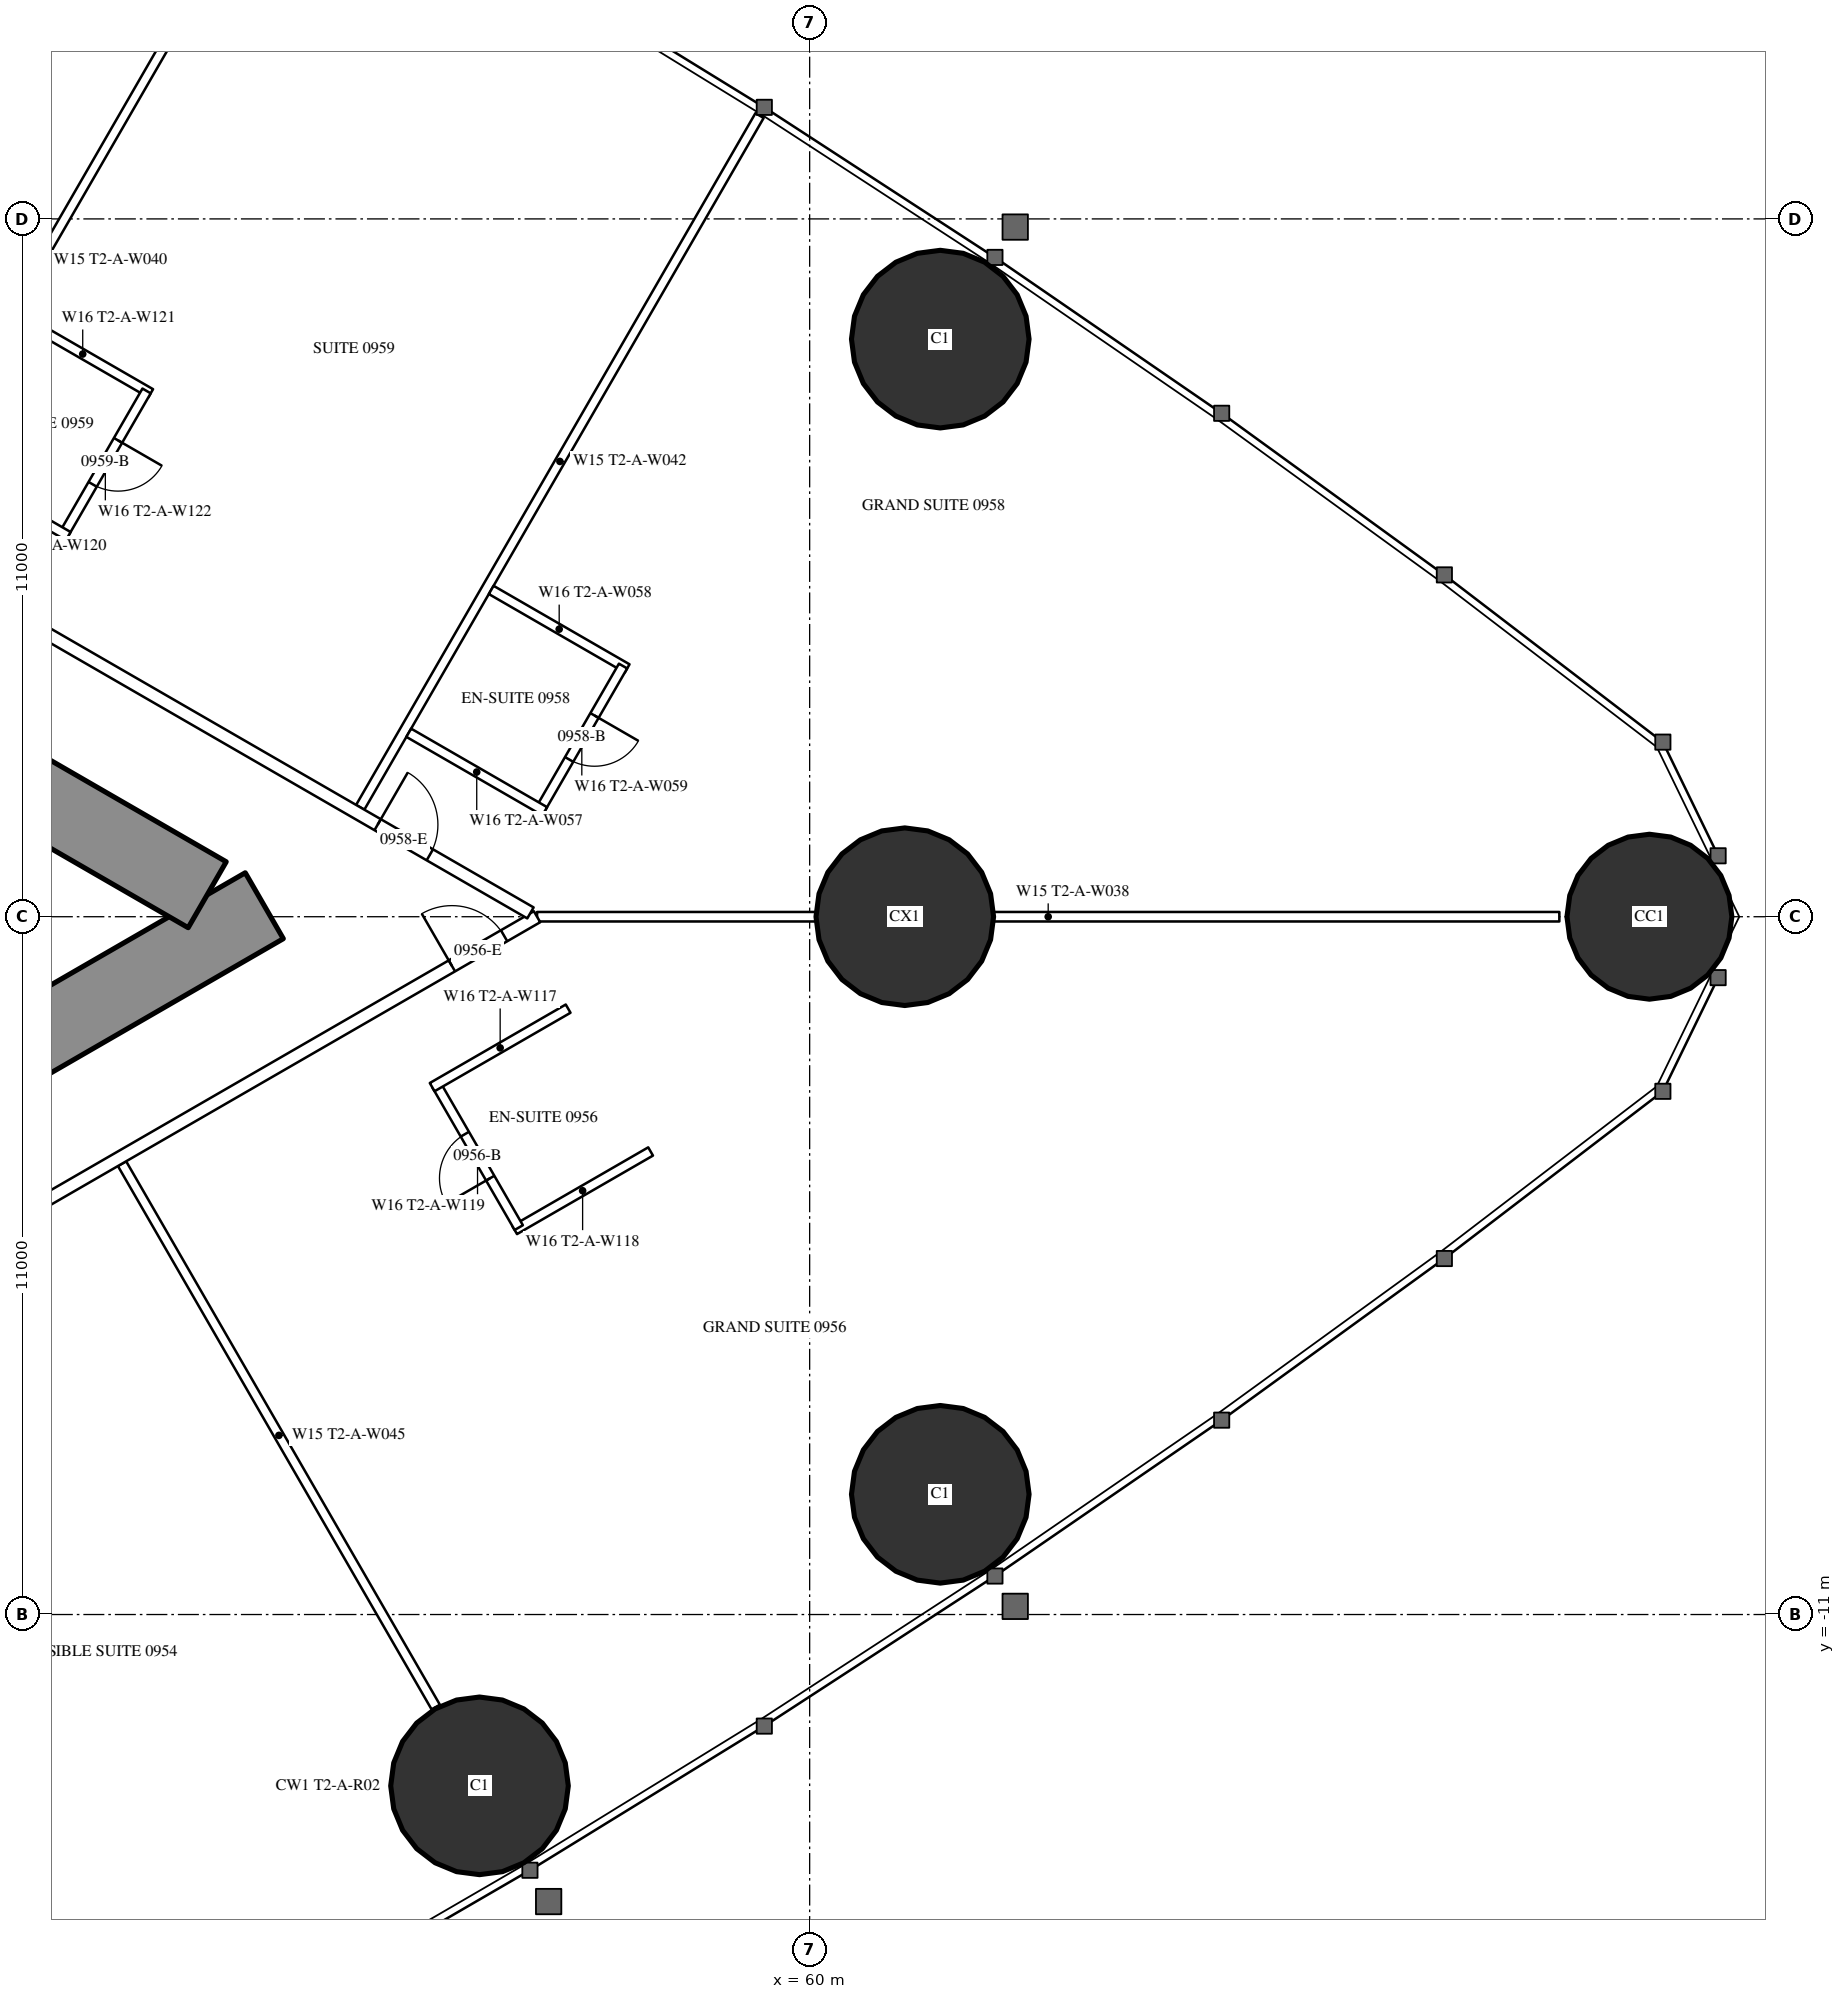
"""IFC4 building model, lengths in metres.
Left out: names, types, materials, properties, quantities, classifications, styles, units other than length and angle.
Written with IfcOpenShell. Run it as: python <this file> out.ifc"""

import sys

from ifc_helpers import new_model, si_unit, direction, frame, frame_2d, origin, origin_2d, place, context, subcontext, project, spatial, rectangle, hollow_circle, extrude, element, fill, save


model = new_model("IFC4")
c1 = context("Model", 3, precision=1e-05, world=origin(), true_north=direction((0.0, 1.0)))
c2 = subcontext(c1, "Body", "Model", "MODEL_VIEW")
j1 = project(units=[si_unit("LENGTHUNIT", "METRE"), si_unit("PLANEANGLEUNIT", "RADIAN")], contexts=[c1])
p1 = place(None, origin())
s1 = spatial("IfcSite", under=j1, at=p1, CompositionType="ELEMENT")
p2 = place(p1, origin())
s2 = spatial("IfcBuilding", under=s1, at=p2, CompositionType="ELEMENT")
p3 = place(p2, frame((0.0, 0.0, 39.0)))
s3 = spatial("IfcBuildingStorey", under=s2, at=p3, CompositionType="ELEMENT", Elevation=39.0)
p4 = place(p3, frame((73.239, 0.0, 0.0), z_axis=(0.0, 0.0, 1.0), x_axis=(1.0, 0.0, 0.0)))
e1 = element("IfcColumn", 1, at=p4, inside=s3, PredefinedType="COLUMN", context=c2, shape_type="SweptSolid", body=[
    extrude(hollow_circle(Radius=1.3, WallThickness=0.1, at=origin_2d()), origin(), (0.0, 0.0, 1.0), 3.5),
])
for number, where, z_axis, x_axis in (
    (2, (62.059, 9.105, 0.0), (0.0, 0.0, 1.0), (1.0, 0.0, 0.0)),
    (3, (54.795, -13.701, 0.0), (0.0, 0.0, 1.0), (1.0, 0.0, 0.0)),
    (4, (62.059, -9.105, 0.0), (0.0, 0.0, 1.0), (1.0, 0.0, 0.0)),
):
    element("IfcColumn", number, at=place(p3, frame(where, z_axis=z_axis, x_axis=x_axis)), inside=s3, PredefinedType="COLUMN", context=c2, shape_type="SweptSolid", body=[
        extrude(hollow_circle(Radius=1.4, WallThickness=0.12, at=origin_2d()), origin(), (0.0, 0.0, 1.0), 3.5),
    ])
p5 = place(p3, frame((61.5, 0.0, 0.0), z_axis=(0.0, 0.0, 1.0), x_axis=(1.0, 0.0, 0.0)))
e5 = element("IfcColumn", 5, at=p5, inside=s3, PredefinedType="COLUMN", context=c2, shape_type="SweptSolid", body=[
    extrude(hollow_circle(Radius=1.4, WallThickness=0.1, at=origin_2d()), origin(), (0.0, 0.0, 1.0), 3.5),
])
p6 = place(p3, frame((27.2, -13.8, 0.0), z_axis=(0.0, 0.0, 1.0), x_axis=(0.866027159892, 0.499996958321, 0.0)))
e6 = element("IfcWall", 6, at=p6, inside=s3, PredefinedType="SHEAR", context=c2, shape_type="SweptSolid", body=[
    extrude(rectangle(XDim=27.947, YDim=1.2, at=frame_2d((13.973, 0.0))), origin(), (0.0, 0.0, 1.0), 3.5),
])
p7 = place(p6, frame((4.6, 0.0, 0.0)))
e7 = element("IfcOpeningElement", 7, at=p7, cuts=e6, PredefinedType="OPENING", context=c2, shape_type="SweptSolid", body=[
    extrude(rectangle(XDim=1.0, YDim=2.2, at=frame_2d((0.5, 1.1))), frame((0.0, 0.61, 0.0), z_axis=(0.0, -1.0, 0.0), x_axis=(1.0, 0.0, 0.0)), (0.0, 0.0, 1.0), 1.22),
])
p8 = place(p6, frame((13.395, 0.0, 0.0)))
e8 = element("IfcOpeningElement", 8, at=p8, cuts=e6, PredefinedType="OPENING", context=c2, shape_type="SweptSolid", body=[
    extrude(rectangle(XDim=1.8, YDim=2.2, at=frame_2d((0.9, 1.1))), frame((0.0, 0.61, 0.0), z_axis=(0.0, -1.0, 0.0), x_axis=(1.0, 0.0, 0.0)), (0.0, 0.0, 1.0), 1.22),
])
p9 = place(p3, frame((27.2, 13.8, 0.0), z_axis=(0.0, 0.0, 1.0), x_axis=(0.866024515034, -0.500001539357, 0.0)))
e9 = element("IfcWall", 9, at=p9, inside=s3, PredefinedType="SHEAR", context=c2, shape_type="SweptSolid", body=[
    extrude(rectangle(XDim=26.907, YDim=1.2, at=frame_2d((13.454, 0.0))), origin(), (0.0, 0.0, 1.0), 3.5),
])
p10 = place(p9, frame((4.6, 0.0, 0.0)))
e10 = element("IfcOpeningElement", 10, at=p10, cuts=e9, PredefinedType="OPENING", context=c2, shape_type="SweptSolid", body=[
    extrude(rectangle(XDim=1.0, YDim=2.2, at=frame_2d((0.5, 1.1))), frame((0.0, 0.61, 0.0), z_axis=(0.0, -1.0, 0.0), x_axis=(1.0, 0.0, 0.0)), (0.0, 0.0, 1.0), 1.22),
])
p11 = place(p9, frame((13.395, 0.0, 0.0)))
e11 = element("IfcOpeningElement", 11, at=p11, cuts=e9, PredefinedType="OPENING", context=c2, shape_type="SweptSolid", body=[
    extrude(rectangle(XDim=1.8, YDim=2.2, at=frame_2d((0.9, 1.1))), frame((0.0, 0.61, 0.0), z_axis=(0.0, -1.0, 0.0), x_axis=(1.0, 0.0, 0.0)), (0.0, 0.0, 1.0), 1.22),
])
p12 = place(p3, frame((49.159, -3.893, 0.0), z_axis=(0.0, 0.0, 1.0), x_axis=(0.499998773722, -0.866026111775, 0.0)))
e12 = element("IfcWall", 12, at=p12, inside=s3, PredefinedType="PARTITIONING", context=c2, shape_type="SweptSolid", body=[
    extrude(rectangle(XDim=9.892, YDim=0.15, at=frame_2d((4.946, 0.0))), origin(), (0.0, 0.0, 1.0), 2.25),
])
p13 = place(p3, frame((45.403, 6.062, 0.0), z_axis=(0.0, 0.0, 1.0), x_axis=(0.500013434677, 0.866017647131, 0.0)))
e13 = element("IfcWall", 13, at=p13, inside=s3, PredefinedType="PARTITIONING", context=c2, shape_type="SweptSolid", body=[
    extrude(rectangle(XDim=9.902, YDim=0.15, at=frame_2d((4.951, 0.0))), origin(), (0.0, 0.0, 1.0), 2.25),
])
p14 = place(p3, frame((52.915, 1.725, 0.0), z_axis=(0.0, 0.0, 1.0), x_axis=(0.499997163113, 0.866027041656, 0.0)))
e14 = element("IfcWall", 14, at=p14, inside=s3, PredefinedType="PARTITIONING", context=c2, shape_type="SweptSolid", body=[
    extrude(rectangle(XDim=12.591, YDim=0.15, at=frame_2d((6.295, 0.0))), origin(), (0.0, 0.0, 1.0), 3.25),
])
p15 = place(p3, frame((55.702, 0.0, 0.0), z_axis=(0.0, 0.0, 1.0), x_axis=(1.0, 0.0, 0.0)))
e15 = element("IfcWall", 15, at=p15, inside=s3, PredefinedType="PARTITIONING", context=c2, shape_type="SweptSolid", body=[
    extrude(rectangle(XDim=16.117, YDim=0.15, at=frame_2d((8.059, 0.0))), origin(), (0.0, 0.0, 1.0), 2.25),
])
p16 = place(p3, frame((37.96, -10.243, 0.0), z_axis=(0.0, 0.0, 1.0), x_axis=(0.866026429433, 0.499998223521, 0.0)))
e16 = element("IfcWall", 16, at=p16, inside=s3, PredefinedType="PARTITIONING", context=c2, shape_type="SweptSolid", body=[
    extrude(rectangle(XDim=20.487, YDim=0.2, at=frame_2d((10.243, 0.0))), origin(), (0.0, 0.0, 1.0), 3.25),
])
p17 = place(p16, frame((7.325, 0.0, 0.0)))
e17 = element("IfcOpeningElement", 17, at=p17, cuts=e16, PredefinedType="OPENING", context=c2, shape_type="SweptSolid", body=[
    extrude(rectangle(XDim=1.0, YDim=2.2, at=frame_2d((0.5, 1.1))), frame((0.0, 0.11, 0.0), z_axis=(0.0, -1.0, 0.0), x_axis=(1.0, 0.0, 0.0)), (0.0, 0.0, 1.0), 0.22),
])
p18 = place(p16, frame((18.937, 0.0, 0.0)))
e18 = element("IfcOpeningElement", 18, at=p18, cuts=e16, PredefinedType="OPENING", context=c2, shape_type="SweptSolid", body=[
    extrude(rectangle(XDim=0.95, YDim=2.2, at=frame_2d((0.475, 1.1))), frame((0.0, 0.11, 0.0), z_axis=(0.0, -1.0, 0.0), x_axis=(1.0, 0.0, 0.0)), (0.0, 0.0, 1.0), 0.22),
])
p19 = place(p16, frame((0.6, 0.0, 0.0)))
e19 = element("IfcOpeningElement", 19, at=p19, cuts=e16, PredefinedType="OPENING", context=c2, shape_type="SweptSolid", body=[
    extrude(rectangle(XDim=0.95, YDim=2.2, at=frame_2d((0.475, 1.1))), frame((0.0, 0.11, 0.0), z_axis=(0.0, -1.0, 0.0), x_axis=(1.0, 0.0, 0.0)), (0.0, 0.0, 1.0), 0.22),
])
p20 = place(p3, frame((36.834, 10.894, 0.0), z_axis=(0.0, 0.0, 1.0), x_axis=(0.866028157229, -0.499995230863, 0.0)))
e20 = element("IfcWall", 20, at=p20, inside=s3, PredefinedType="PARTITIONING", context=c2, shape_type="SweptSolid", body=[
    extrude(rectangle(XDim=21.667, YDim=0.2, at=frame_2d((10.833, 0.0))), origin(), (0.0, 0.0, 1.0), 3.25),
])
p21 = place(p20, frame((18.885, 0.0, 0.0)))
e21 = element("IfcOpeningElement", 21, at=p21, cuts=e20, PredefinedType="OPENING", context=c2, shape_type="SweptSolid", body=[
    extrude(rectangle(XDim=0.95, YDim=2.2, at=frame_2d((0.475, 1.1))), frame((0.0, 0.11, 0.0), z_axis=(0.0, -1.0, 0.0), x_axis=(1.0, 0.0, 0.0)), (0.0, 0.0, 1.0), 0.22),
])
p22 = place(p20, frame((10.212, 0.0, 0.0)))
e22 = element("IfcOpeningElement", 22, at=p22, cuts=e20, PredefinedType="OPENING", context=c2, shape_type="SweptSolid", body=[
    extrude(rectangle(XDim=0.95, YDim=2.2, at=frame_2d((0.475, 1.1))), frame((0.0, 0.11, 0.0), z_axis=(0.0, -1.0, 0.0), x_axis=(1.0, 0.0, 0.0)), (0.0, 0.0, 1.0), 0.22),
])
p23 = place(p20, frame((8.225, 0.0, 0.0)))
e23 = element("IfcOpeningElement", 23, at=p23, cuts=e20, PredefinedType="OPENING", context=c2, shape_type="SweptSolid", body=[
    extrude(rectangle(XDim=0.95, YDim=2.2, at=frame_2d((0.475, 1.1))), frame((0.0, 0.11, 0.0), z_axis=(0.0, -1.0, 0.0), x_axis=(1.0, 0.0, 0.0)), (0.0, 0.0, 1.0), 0.22),
])
p24 = place(p20, frame((1.825, 0.0, 0.0)))
e24 = element("IfcOpeningElement", 24, at=p24, cuts=e20, PredefinedType="OPENING", context=c2, shape_type="SweptSolid", body=[
    extrude(rectangle(XDim=0.95, YDim=2.2, at=frame_2d((0.475, 1.1))), frame((0.0, 0.11, 0.0), z_axis=(0.0, -1.0, 0.0), x_axis=(1.0, 0.0, 0.0)), (0.0, 0.0, 1.0), 0.22),
])
p25 = place(p20, frame((0.246, 0.0, 0.0)))
e25 = element("IfcOpeningElement", 25, at=p25, cuts=e20, PredefinedType="OPENING", context=c2, shape_type="SweptSolid", body=[
    extrude(rectangle(XDim=0.9, YDim=2.2, at=frame_2d((0.45, 1.1))), frame((0.0, 0.11, 0.0), z_axis=(0.0, -1.0, 0.0), x_axis=(1.0, 0.0, 0.0)), (0.0, 0.0, 1.0), 0.22),
])
p26 = place(p3, frame((55.349, -4.938, 0.0), z_axis=(0.0, 0.0, 1.0), x_axis=(0.866006523861, 0.500032699561, 0.0)))
e26 = element("IfcWall", 26, at=p26, inside=s3, PredefinedType="PARTITIONING", context=c2, shape_type="SweptSolid", body=[
    extrude(rectangle(XDim=2.475, YDim=0.15, at=frame_2d((1.237, 0.0))), origin(), (0.0, 0.0, 1.0), 3.25),
])
p27 = place(p3, frame((54.114, -2.649, 0.0), z_axis=(0.0, 0.0, 1.0), x_axis=(0.500006934395, -0.866021400173, 0.0)))
e27 = element("IfcWall", 27, at=p27, inside=s3, PredefinedType="PARTITIONING", context=c2, shape_type="SweptSolid", body=[
    extrude(rectangle(XDim=2.6, YDim=0.15, at=frame_2d((1.3, 0.0))), origin(), (0.0, 0.0, 1.0), 3.25),
])
p28 = place(p27, frame((0.9, 0.0, 0.0)))
e28 = element("IfcOpeningElement", 28, at=p28, cuts=e27, PredefinedType="OPENING", context=c2, shape_type="SweptSolid", body=[
    extrude(rectangle(XDim=0.8, YDim=2.2, at=frame_2d((0.4, 1.1))), frame((0.0, 0.085, 0.0), z_axis=(0.0, -1.0, 0.0), x_axis=(1.0, 0.0, 0.0)), (0.0, 0.0, 1.0), 0.17),
])
for number, where, z_axis, x_axis in (
    (29, (54.049, -2.687, 0.0), (0.0, 0.0, 1.0), (0.866, 0.5, 0.0)),
    (30, (54.98, 5.151, 0.0), (0.0, 0.0, 1.0), (0.866, -0.5, 0.0)),
):
    element("IfcWall", number, at=place(p3, frame(where, z_axis=z_axis, x_axis=x_axis)), inside=s3, PredefinedType="PARTITIONING", context=c2, shape_type="SweptSolid", body=[
        extrude(rectangle(XDim=2.475, YDim=0.15, at=frame_2d((1.237, 0.0))), origin(), (0.0, 0.0, 1.0), 3.25),
    ])
p29 = place(p3, frame((55.758, 1.7, 0.0), z_axis=(0.0, 0.0, 1.0), x_axis=(0.500006934395, 0.866021400173, 0.0)))
e31 = element("IfcWall", 31, at=p29, inside=s3, PredefinedType="PARTITIONING", context=c2, shape_type="SweptSolid", body=[
    extrude(rectangle(XDim=2.6, YDim=0.15, at=frame_2d((1.3, 0.0))), origin(), (0.0, 0.0, 1.0), 3.25),
])
p30 = place(p29, frame((0.9, 0.0, 0.0)))
e32 = element("IfcOpeningElement", 32, at=p30, cuts=e31, PredefinedType="OPENING", context=c2, shape_type="SweptSolid", body=[
    extrude(rectangle(XDim=0.8, YDim=2.2, at=frame_2d((0.4, 1.1))), frame((0.0, 0.085, 0.0), z_axis=(0.0, -1.0, 0.0), x_axis=(1.0, 0.0, 0.0)), (0.0, 0.0, 1.0), 0.17),
])
for number, where, z_axis, x_axis in (
    (33, (53.68, 2.9, 0.0), (0.0, 0.0, 1.0), (0.866, -0.5, 0.0)),
    (34, (47.468, 9.488, 0.0), (0.0, 0.0, 1.0), (0.866, -0.5, 0.0)),
):
    element("IfcWall", number, at=place(p3, frame(where, z_axis=z_axis, x_axis=x_axis)), inside=s3, PredefinedType="PARTITIONING", context=c2, shape_type="SweptSolid", body=[
        extrude(rectangle(XDim=2.475, YDim=0.15, at=frame_2d((1.237, 0.0))), origin(), (0.0, 0.0, 1.0), 3.25),
    ])
p31 = place(p3, frame((48.246, 6.037, 0.0), z_axis=(0.0, 0.0, 1.0), x_axis=(0.500006934395, 0.866021400173, 0.0)))
e35 = element("IfcWall", 35, at=p31, inside=s3, PredefinedType="PARTITIONING", context=c2, shape_type="SweptSolid", body=[
    extrude(rectangle(XDim=2.6, YDim=0.15, at=frame_2d((1.3, 0.0))), origin(), (0.0, 0.0, 1.0), 3.25),
])
p32 = place(p31, frame((0.9, 0.0, 0.0)))
e36 = element("IfcOpeningElement", 36, at=p32, cuts=e35, PredefinedType="OPENING", context=c2, shape_type="SweptSolid", body=[
    extrude(rectangle(XDim=0.8, YDim=2.2, at=frame_2d((0.4, 1.1))), frame((0.0, 0.085, 0.0), z_axis=(0.0, -1.0, 0.0), x_axis=(1.0, 0.0, 0.0)), (0.0, 0.0, 1.0), 0.17),
])
p33 = place(p3, frame((46.168, 7.237, 0.0), z_axis=(0.0, 0.0, 1.0), x_axis=(0.866006523861, -0.500032699561, 0.0)))
e37 = element("IfcWall", 37, at=p33, inside=s3, PredefinedType="PARTITIONING", context=c2, shape_type="SweptSolid", body=[
    extrude(rectangle(XDim=2.475, YDim=0.15, at=frame_2d((1.237, 0.0))), origin(), (0.0, 0.0, 1.0), 3.25),
])
p34 = place(p28, origin())
e38 = element("IfcDoor", 38, at=p34, inside=s3, OperationType="SINGLE_SWING_RIGHT", PredefinedType="DOOR", context=c2, shape_type="SweptSolid", body=[
    extrude(rectangle(XDim=0.8, YDim=2.2, at=frame_2d((0.4, 1.1))), frame((0.0, 0.025, 0.0), z_axis=(0.0, -1.0, 0.0), x_axis=(1.0, 0.0, 0.0)), (0.0, 0.0, 1.0), 0.05),
])
fill(e28, e38)
p35 = place(p18, origin())
e39 = element("IfcDoor", 39, at=p35, inside=s3, OperationType="SINGLE_SWING_LEFT", PredefinedType="DOOR", context=c2, shape_type="SweptSolid", body=[
    extrude(rectangle(XDim=0.95, YDim=2.2, at=frame_2d((0.475, 1.1))), frame((0.0, 0.025, 0.0), z_axis=(0.0, -1.0, 0.0), x_axis=(1.0, 0.0, 0.0)), (0.0, 0.0, 1.0), 0.05),
])
fill(e18, e39)
p36 = place(p30, origin())
e40 = element("IfcDoor", 40, at=p36, inside=s3, OperationType="SINGLE_SWING_RIGHT", PredefinedType="DOOR", context=c2, shape_type="SweptSolid", body=[
    extrude(rectangle(XDim=0.8, YDim=2.2, at=frame_2d((0.4, 1.1))), frame((0.0, 0.025, 0.0), z_axis=(0.0, -1.0, 0.0), x_axis=(1.0, 0.0, 0.0)), (0.0, 0.0, 1.0), 0.05),
])
fill(e32, e40)
p37 = place(p21, origin())
e41 = element("IfcDoor", 41, at=p37, inside=s3, OperationType="SINGLE_SWING_LEFT", PredefinedType="DOOR", context=c2, shape_type="SweptSolid", body=[
    extrude(rectangle(XDim=0.95, YDim=2.2, at=frame_2d((0.475, 1.1))), frame((0.0, 0.025, 0.0), z_axis=(0.0, -1.0, 0.0), x_axis=(1.0, 0.0, 0.0)), (0.0, 0.0, 1.0), 0.05),
])
fill(e21, e41)
p38 = place(p32, origin())
e42 = element("IfcDoor", 42, at=p38, inside=s3, OperationType="SINGLE_SWING_RIGHT", PredefinedType="DOOR", context=c2, shape_type="SweptSolid", body=[
    extrude(rectangle(XDim=0.8, YDim=2.2, at=frame_2d((0.4, 1.1))), frame((0.0, 0.025, 0.0), z_axis=(0.0, -1.0, 0.0), x_axis=(1.0, 0.0, 0.0)), (0.0, 0.0, 1.0), 0.05),
])
fill(e36, e42)
save(model, sys.argv[1])
